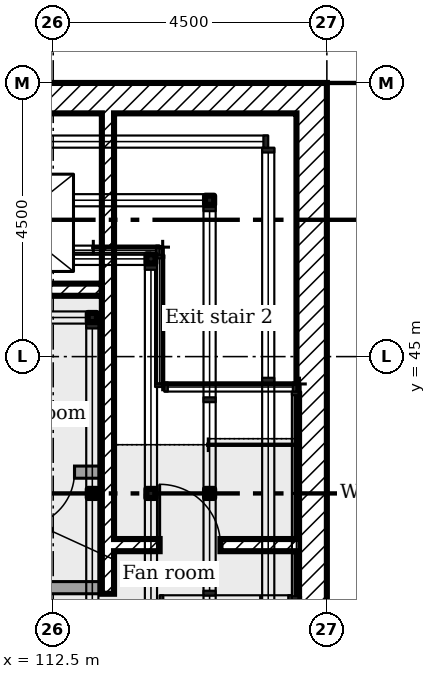
"""IFC4 building model, lengths in metres.
Left out: names, types, materials, properties, quantities, classifications, styles, units other than length and angle.
Written with IfcOpenShell. Run it as: python <this file> out.ifc"""

import sys

from ifc_helpers import new_model, si_unit, direction, frame, frame_2d, origin, origin_2d, place, context, subcontext, project, spatial, rectangle, hollow_rectangle, extrude, element, fill, save


model = new_model("IFC4")
c1 = context("Model", 3, precision=1e-05, world=origin(), true_north=direction((0.0, 1.0)))
c2 = subcontext(c1, "Body", "Model", "MODEL_VIEW")
j1 = project(units=[si_unit("LENGTHUNIT", "METRE"), si_unit("PLANEANGLEUNIT", "RADIAN")], contexts=[c1])
p1 = place(None, origin())
s1 = spatial("IfcSite", under=j1, at=p1, CompositionType="ELEMENT")
p2 = place(p1, origin())
s2 = spatial("IfcBuilding", under=s1, at=p2, CompositionType="ELEMENT")
p3 = place(p2, frame((0.0, 0.0, 210.0)))
s3 = spatial("IfcBuildingStorey", under=s2, at=p3, CompositionType="ELEMENT", Elevation=210.0)
for number, where, z_axis, x_axis in (
    (1, (116.875, 36.25, 3.6), (0.0, 0.0, 1.0), (0.0, 1.0, 0.0)),
    (2, (116.75, 49.375, 3.6), (0.0, 0.0, 1.0), (-1.0, 0.0, 0.0)),
):
    element("IfcWall", number, at=place(p3, frame(where, z_axis=z_axis, x_axis=x_axis)), inside=s3, PredefinedType="PARAPET", context=c2, shape_type="SweptSolid", body=[
        extrude(rectangle(XDim=13.25, YDim=0.25, at=frame_2d((6.625, 0.0))), origin(), (0.0, 0.0, 1.0), 1.1),
    ])
for number, where in (
    (3, (115.072, 42.75, 3.6)),
    (4, (115.072, 47.572, 3.6)),
):
    element("IfcColumn", number, at=place(p3, frame(where)), inside=s3, PredefinedType="COLUMN", context=c2, shape_type="SweptSolid", body=[
        extrude(hollow_rectangle(XDim=0.15, YDim=0.15, WallThickness=0.008, at=origin_2d()), origin(), (0.0, 0.0, 1.0), 1.84),
    ])
for number, where in (
    (5, (114.107, 42.75, 3.6)),
    (6, (114.107, 46.607, 3.6)),
):
    element("IfcColumn", number, at=place(p3, frame(where)), inside=s3, PredefinedType="COLUMN", context=c2, shape_type="SweptSolid", body=[
        extrude(hollow_rectangle(XDim=0.15, YDim=0.15, WallThickness=0.008, at=origin_2d()), origin(), (0.0, 0.0, 1.0), 3.99),
    ])
for number, where in (
    (7, (113.143, 42.75, 3.6)),
    (8, (113.143, 45.643, 3.6)),
):
    element("IfcColumn", number, at=place(p3, frame(where)), inside=s3, PredefinedType="COLUMN", context=c2, shape_type="SweptSolid", body=[
        extrude(hollow_rectangle(XDim=0.15, YDim=0.15, WallThickness=0.008, at=origin_2d()), origin(), (0.0, 0.0, 1.0), 6.18),
    ])
p4 = place(p3, frame((116.75, 36.0, 0.0), z_axis=(0.0, 0.0, 1.0), x_axis=(0.0, 1.0, 0.0)))
e9 = element("IfcWall", 9, at=p4, inside=s3, PredefinedType="SHEAR", context=c2, shape_type="SweptSolid", body=[
    extrude(rectangle(XDim=13.5, YDim=0.5, at=frame_2d((6.75, 0.0))), origin(), (0.0, 0.0, 1.0), 3.2),
])
p5 = place(p3, frame((103.5, 49.25, 0.0)))
e10 = element("IfcWall", 10, at=p5, inside=s3, PredefinedType="SHEAR", context=c2, shape_type="SweptSolid", body=[
    extrude(rectangle(XDim=13.0, YDim=0.5, at=frame_2d((6.5, 0.0))), origin(), (0.0, 0.0, 1.0), 3.2),
])
p6 = place(p3, frame((110.467, 46.1, 0.0)))
e11 = element("IfcWall", 11, at=p6, inside=s3, PredefinedType="SHEAR", context=c2, shape_type="SweptSolid", body=[
    extrude(rectangle(XDim=2.833, YDim=0.2, at=frame_2d((1.417, 0.0))), origin(), (0.0, 0.0, 1.0), 3.2),
])
p7 = place(p6, frame((0.767, 0.0, 0.0)))
e12 = element("IfcOpeningElement", 12, at=p7, cuts=e11, PredefinedType="OPENING", context=c2, shape_type="SweptSolid", body=[
    extrude(rectangle(XDim=1.2, YDim=2.1, at=frame_2d((0.6, 1.05))), frame((0.0, 0.11, 0.0), z_axis=(0.0, -1.0, 0.0), x_axis=(1.0, 0.0, 0.0)), (0.0, 0.0, 1.0), 0.22),
])
p8 = place(p3, frame((113.5, 41.9, 0.0)))
e13 = element("IfcWall", 13, at=p8, inside=s3, PredefinedType="SHEAR", context=c2, shape_type="SweptSolid", body=[
    extrude(rectangle(XDim=3.0, YDim=0.2, at=frame_2d((1.5, 0.0))), origin(), (0.0, 0.0, 1.0), 3.2),
])
p9 = place(p8, frame((0.75, 0.0, 0.0)))
e14 = element("IfcOpeningElement", 14, at=p9, cuts=e13, PredefinedType="OPENING", context=c2, shape_type="SweptSolid", body=[
    extrude(rectangle(XDim=1.0, YDim=2.1, at=frame_2d((0.5, 1.05))), frame((0.0, 0.11, 0.0), z_axis=(0.0, -1.0, 0.0), x_axis=(1.0, 0.0, 0.0)), (0.0, 0.0, 1.0), 0.22),
])
p10 = place(p3, frame((113.4, 41.1, 0.0), z_axis=(0.0, 0.0, 1.0), x_axis=(0.0, 1.0, 0.0)))
e15 = element("IfcWall", 15, at=p10, inside=s3, PredefinedType="SHEAR", context=c2, shape_type="SweptSolid", body=[
    extrude(rectangle(XDim=7.9, YDim=0.2, at=frame_2d((3.95, 0.0))), origin(), (0.0, 0.0, 1.0), 3.2),
])
p11 = place(p3, frame((107.2, 43.1, 0.0)))
e16 = element("IfcWall", 16, at=p11, inside=s3, PredefinedType="PARTITIONING", context=c2, shape_type="SweptSolid", body=[
    extrude(rectangle(XDim=6.1, YDim=0.2, at=frame_2d((3.05, 0.0))), origin(), (0.0, 0.0, 1.0), 3.2),
])
p12 = place(p11, frame((4.75, 0.0, 0.0)))
e17 = element("IfcOpeningElement", 17, at=p12, cuts=e16, PredefinedType="OPENING", context=c2, shape_type="SweptSolid", body=[
    extrude(rectangle(XDim=0.9, YDim=2.1, at=frame_2d((0.45, 1.05))), frame((0.0, 0.11, 0.0), z_axis=(0.0, -1.0, 0.0), x_axis=(1.0, 0.0, 0.0)), (0.0, 0.0, 1.0), 0.22),
])
p13 = place(p3, frame((107.2, 41.2, 0.0)))
e18 = element("IfcWall", 18, at=p13, inside=s3, PredefinedType="PARTITIONING", context=c2, shape_type="SweptSolid", body=[
    extrude(rectangle(XDim=6.1, YDim=0.2, at=frame_2d((3.05, 0.0))), origin(), (0.0, 0.0, 1.0), 3.2),
])
p14 = place(p13, frame((0.4, 0.0, 0.0)))
e19 = element("IfcOpeningElement", 19, at=p14, cuts=e18, PredefinedType="OPENING", context=c2, shape_type="SweptSolid", body=[
    extrude(rectangle(XDim=0.9, YDim=2.1, at=frame_2d((0.45, 1.05))), frame((0.0, 0.11, 0.0), z_axis=(0.0, -1.0, 0.0), x_axis=(1.0, 0.0, 0.0)), (0.0, 0.0, 1.0), 0.22),
])
p15 = place(p13, frame((2.55, 0.0, 0.0)))
e20 = element("IfcOpeningElement", 20, at=p15, cuts=e18, PredefinedType="OPENING", context=c2, shape_type="SweptSolid", body=[
    extrude(rectangle(XDim=0.9, YDim=2.1, at=frame_2d((0.45, 1.05))), frame((0.0, 0.11, 0.0), z_axis=(0.0, -1.0, 0.0), x_axis=(1.0, 0.0, 0.0)), (0.0, 0.0, 1.0), 0.22),
])
p16 = place(p9, origin())
e21 = element("IfcDoor", 21, at=p16, inside=s3, OperationType="SINGLE_SWING_RIGHT", PredefinedType="DOOR", context=c2, shape_type="SweptSolid", body=[
    extrude(rectangle(XDim=1.0, YDim=2.1, at=frame_2d((0.5, 1.05))), frame((0.0, 0.025, 0.0), z_axis=(0.0, -1.0, 0.0), x_axis=(1.0, 0.0, 0.0)), (0.0, 0.0, 1.0), 0.05),
])
fill(e14, e21)
p17 = place(p12, frame((0.9, 0.0, 0.0), x_axis=(-1.0, 0.0, 0.0)))
e22 = element("IfcDoor", 22, at=p17, inside=s3, OperationType="SINGLE_SWING_LEFT", PredefinedType="DOOR", context=c2, shape_type="SweptSolid", body=[
    extrude(rectangle(XDim=0.9, YDim=2.1, at=frame_2d((0.45, 1.05))), frame((0.0, 0.025, 0.0), z_axis=(0.0, -1.0, 0.0), x_axis=(1.0, 0.0, 0.0)), (0.0, 0.0, 1.0), 0.05),
])
fill(e17, e22)
save(model, sys.argv[1])
